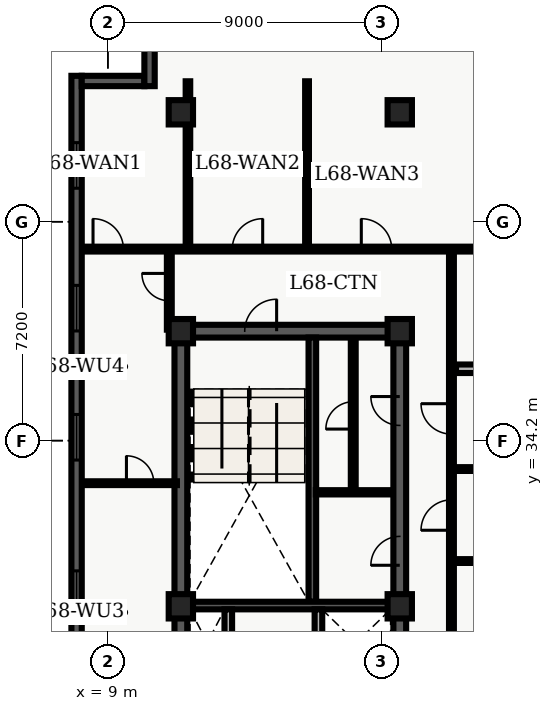
"""IFC4 building model, lengths in metres.
Left out: names, types, materials, properties, quantities, classifications, styles, units other than length and angle.
Written with IfcOpenShell. Run it as: python <this file> out.ifc"""

import sys

from ifc_helpers import new_model, entity, si_unit, converted_unit, direction, frame, origin_with_axes, origin_2d_with_axis, place, context, subcontext, project, spatial, polyline, rectangle, outline, extrude, element, fill, save


model = new_model("IFC4")
c1 = context("Model", 3, precision=1e-05, world=origin_with_axes(), true_north=direction((0.0, 1.0)))
c2 = subcontext(c1, "Body", "Model", "MODEL_VIEW")
j1 = project(units=[si_unit("LENGTHUNIT", "METRE"), converted_unit("PLANEANGLEUNIT", "DEGREE", entity("IfcPlaneAngleMeasure", 0.017), si_unit("PLANEANGLEUNIT", "RADIAN"), dimensions=[0, 0, 0, 0, 0, 0, 0])], contexts=[c1])
p1 = place(None, origin_with_axes())
s1 = spatial("IfcSite", under=j1, at=p1, CompositionType="ELEMENT")
p2 = place(p1, origin_with_axes())
s2 = spatial("IfcBuilding", under=s1, at=p2, CompositionType="ELEMENT")
p3 = place(p2, frame((0.0, 0.0, 276.3), z_axis=(0.0, 0.0, 1.0), x_axis=(1.0, 0.0, 0.0)))
s3 = spatial("IfcBuildingStorey", under=s2, at=p3, CompositionType="ELEMENT", Elevation=276.3)
p4 = place(p3, frame((11.4, 10.8, 0.0), z_axis=(0.0, 0.0, 1.0), x_axis=(0.0, 1.0, 0.0)))
e1 = element("IfcWall", 1, at=p4, inside=s3, PredefinedType="SHEAR", context=c2, shape_type="SweptSolid", body=[
    extrude(outline(polyline([(0.0, -0.21), (27.0, -0.21), (27.0, 0.21), (0.0, 0.21), (0.0, -0.21)])), origin_with_axes(), (0.0, 0.0, 1.0), 3.66),
])
p5 = place(p3, frame((11.4, 37.8, 0.0), z_axis=(0.0, 0.0, 1.0), x_axis=(1.0, 0.0, 0.0)))
e2 = element("IfcWall", 2, at=p5, inside=s3, PredefinedType="SHEAR", context=c2, shape_type="SweptSolid", body=[
    extrude(outline(polyline([(0.0, -0.21), (7.2, -0.21), (7.2, 0.21), (0.0, 0.21), (0.0, -0.21)])), origin_with_axes(), (0.0, 0.0, 1.0), 3.66),
])
p6 = place(p5, frame((2.625, 0.0, 0.0), z_axis=(0.0, 0.0, 1.0), x_axis=(1.0, 0.0, 0.0)))
e3 = element("IfcOpeningElement", 3, at=p6, cuts=e2, PredefinedType="OPENING", context=c2, shape_type="SweptSolid", body=[
    extrude(rectangle(XDim=1.05, YDim=0.44, at=origin_2d_with_axis()), origin_with_axes(), (0.0, 0.0, 1.0), 2.15),
])
p7 = place(p3, frame((18.6, 24.3, 0.0), z_axis=(0.0, 0.0, 1.0), x_axis=(0.0, 1.0, 0.0)))
e4 = element("IfcWall", 4, at=p7, inside=s3, PredefinedType="SHEAR", context=c2, shape_type="SweptSolid", body=[
    extrude(outline(polyline([(0.0, -0.21), (13.5, -0.21), (13.5, 0.21), (0.0, 0.21), (0.0, -0.21)])), origin_with_axes(), (0.0, 0.0, 1.0), 3.66),
])
p8 = place(p7, frame((6.275, 0.0, 0.0), z_axis=(0.0, 0.0, 1.0), x_axis=(1.0, 0.0, 0.0)))
e5 = element("IfcOpeningElement", 5, at=p8, cuts=e4, PredefinedType="OPENING", context=c2, shape_type="SweptSolid", body=[
    extrude(rectangle(XDim=0.95, YDim=0.44, at=origin_2d_with_axis()), origin_with_axes(), (0.0, 0.0, 1.0), 2.15),
])
p9 = place(p7, frame((10.875, 0.0, 0.0), z_axis=(0.0, 0.0, 1.0), x_axis=(1.0, 0.0, 0.0)))
e6 = element("IfcOpeningElement", 6, at=p9, cuts=e4, PredefinedType="OPENING", context=c2, shape_type="SweptSolid", body=[
    extrude(rectangle(XDim=0.95, YDim=0.44, at=origin_2d_with_axis()), origin_with_axes(), (0.0, 0.0, 1.0), 2.15),
])
p10 = place(p3, frame((15.725, 28.9, 0.0), z_axis=(0.0, 0.0, 1.0), x_axis=(0.0, 1.0, 0.0)))
e7 = element("IfcWall", 7, at=p10, inside=s3, PredefinedType="SHEAR", context=c2, shape_type="SweptSolid", body=[
    extrude(outline(polyline([(0.0, -0.125), (8.69, -0.125), (8.69, 0.125), (0.0, 0.125), (0.0, -0.125)])), origin_with_axes(), (0.0, 0.0, 1.0), 3.66),
])
p11 = place(p3, frame((11.61, 28.775, 0.0), z_axis=(0.0, 0.0, 1.0), x_axis=(1.0, 0.0, 0.0)))
e8 = element("IfcWall", 8, at=p11, inside=s3, PredefinedType="SHEAR", context=c2, shape_type="SweptSolid", body=[
    extrude(outline(polyline([(0.0, -0.125), (6.78, -0.125), (6.78, 0.125), (0.0, 0.125), (0.0, -0.125)])), origin_with_axes(), (0.0, 0.0, 1.0), 3.66),
])
for number, where, z_axis, x_axis in (
    (9, (12.96, 26.45, 0.0), (0.0, 0.0, 1.0), (0.0, 1.0, 0.0)),
    (10, (15.925, 26.45, 0.0), (0.0, 0.0, 1.0), (0.0, 1.0, 0.0)),
):
    element("IfcWall", number, at=place(p3, frame(where, z_axis=z_axis, x_axis=x_axis)), inside=s3, PredefinedType="SOLIDWALL", context=c2, shape_type="SweptSolid", body=[
        extrude(outline(polyline([(0.0, -0.125), (2.2, -0.125), (2.2, 0.125), (0.0, 0.125), (0.0, -0.125)])), origin_with_axes(), (0.0, 0.0, 1.0), 2.7),
    ])
for number, where, z_axis, x_axis in (
    (11, (11.4, 28.75, 0.0), (0.0, 0.0, 1.0), (1.0, 0.0, 0.0)),
    (12, (11.4, 37.8, 0.0), (0.0, 0.0, 1.0), (1.0, 0.0, 0.0)),
    (13, (11.4, 45.0, 0.0), (0.0, 0.0, 1.0), (1.0, 0.0, 0.0)),
    (14, (18.6, 28.75, 0.0), (0.0, 0.0, 1.0), (1.0, 0.0, 0.0)),
    (15, (18.6, 37.8, 0.0), (0.0, 0.0, 1.0), (1.0, 0.0, 0.0)),
    (16, (18.6, 45.0, 0.0), (0.0, 0.0, 1.0), (1.0, 0.0, 0.0)),
):
    element("IfcColumn", number, at=place(p3, frame(where, z_axis=z_axis, x_axis=x_axis)), inside=s3, PredefinedType="COLUMN", context=c2, shape_type="SweptSolid", body=[
        extrude(rectangle(XDim=0.8, YDim=0.8, at=origin_2d_with_axis()), origin_with_axes(), (0.0, 0.0, 1.0), 3.9),
    ])
p12 = place(p3, frame((15.84, 32.5, 0.0), z_axis=(0.0, 0.0, 1.0), x_axis=(1.0, 0.0, 0.0)))
e17 = element("IfcWall", 17, at=p12, inside=s3, PredefinedType="PARTITIONING", context=c2, shape_type="SweptSolid", body=[
    extrude(outline(polyline([(0.0, -0.07), (2.46, -0.07), (2.46, 0.07), (0.0, 0.07), (0.0, -0.07)])), origin_with_axes(), (0.0, 0.0, 1.0), 2.7),
])
p13 = place(p3, frame((17.07, 32.58, 0.0), z_axis=(0.0, 0.0, 1.0), x_axis=(0.0, 1.0, 0.0)))
e18 = element("IfcWall", 18, at=p13, inside=s3, PredefinedType="PARTITIONING", context=c2, shape_type="SweptSolid", body=[
    extrude(outline(polyline([(0.0, -0.08), (4.92, -0.08), (4.92, 0.08), (0.0, 0.08), (0.0, -0.08)])), origin_with_axes(), (0.0, 0.0, 1.0), 2.7),
])
p14 = place(p13, frame((2.45, 0.0, 0.0), z_axis=(0.0, 0.0, 1.0), x_axis=(1.0, 0.0, 0.0)))
e19 = element("IfcOpeningElement", 19, at=p14, cuts=e18, PredefinedType="OPENING", context=c2, shape_type="SweptSolid", body=[
    extrude(rectangle(XDim=0.9, YDim=0.18, at=origin_2d_with_axis()), origin_with_axes(), (0.0, 0.0, 1.0), 2.15),
])
p15 = place(p3, frame((8.135, 40.5, 0.0), z_axis=(0.0, 0.0, 1.0), x_axis=(1.0, 0.0, 0.0)))
e20 = element("IfcWall", 20, at=p15, inside=s3, PredefinedType="PARTITIONING", context=c2, shape_type="SweptSolid", body=[
    extrude(outline(polyline([(0.0, -0.08), (23.93, -0.08), (23.93, 0.08), (0.0, 0.08), (0.0, -0.08)])), origin_with_axes(), (0.0, 0.0, 1.0), 2.7),
])
p16 = place(p15, frame((0.876, 0.0, 0.0), z_axis=(0.0, 0.0, 1.0), x_axis=(1.0, 0.0, 0.0)))
e21 = element("IfcOpeningElement", 21, at=p16, cuts=e20, PredefinedType="OPENING", context=c2, shape_type="SweptSolid", body=[
    extrude(rectangle(XDim=1.0, YDim=0.18, at=origin_2d_with_axis()), origin_with_axes(), (0.0, 0.0, 1.0), 2.15),
])
p17 = place(p15, frame((5.457, 0.0, 0.0), z_axis=(0.0, 0.0, 1.0), x_axis=(1.0, 0.0, 0.0)))
e22 = element("IfcOpeningElement", 22, at=p17, cuts=e20, PredefinedType="OPENING", context=c2, shape_type="SweptSolid", body=[
    extrude(rectangle(XDim=1.0, YDim=0.18, at=origin_2d_with_axis()), origin_with_axes(), (0.0, 0.0, 1.0), 2.15),
])
p18 = place(p15, frame((9.7, 0.0, 0.0), z_axis=(0.0, 0.0, 1.0), x_axis=(1.0, 0.0, 0.0)))
e23 = element("IfcOpeningElement", 23, at=p18, cuts=e20, PredefinedType="OPENING", context=c2, shape_type="SweptSolid", body=[
    extrude(rectangle(XDim=1.0, YDim=0.18, at=origin_2d_with_axis()), origin_with_axes(), (0.0, 0.0, 1.0), 2.15),
])
p19 = place(p3, frame((20.3, 7.8, 0.0), z_axis=(0.0, 0.0, 1.0), x_axis=(0.0, 1.0, 0.0)))
e24 = element("IfcWall", 24, at=p19, inside=s3, PredefinedType="PARTITIONING", context=c2, shape_type="SweptSolid", body=[
    extrude(outline(polyline([(0.0, -0.08), (32.7, -0.08), (32.7, 0.08), (0.0, 0.08), (0.0, -0.08)])), origin_with_axes(), (0.0, 0.0, 1.0), 2.7),
])
p20 = place(p19, frame((14.392, 0.0, 0.0), z_axis=(0.0, 0.0, 1.0), x_axis=(1.0, 0.0, 0.0)))
e25 = element("IfcOpeningElement", 25, at=p20, cuts=e24, PredefinedType="OPENING", context=c2, shape_type="SweptSolid", body=[
    extrude(rectangle(XDim=1.0, YDim=0.18, at=origin_2d_with_axis()), origin_with_axes(), (0.0, 0.0, 1.0), 2.15),
])
p21 = place(p19, frame((18.846, 0.0, 0.0), z_axis=(0.0, 0.0, 1.0), x_axis=(1.0, 0.0, 0.0)))
e26 = element("IfcOpeningElement", 26, at=p21, cuts=e24, PredefinedType="OPENING", context=c2, shape_type="SweptSolid", body=[
    extrude(rectangle(XDim=1.0, YDim=0.18, at=origin_2d_with_axis()), origin_with_axes(), (0.0, 0.0, 1.0), 2.15),
])
p22 = place(p19, frame((23.952, 0.0, 0.0), z_axis=(0.0, 0.0, 1.0), x_axis=(1.0, 0.0, 0.0)))
e27 = element("IfcOpeningElement", 27, at=p22, cuts=e24, PredefinedType="OPENING", context=c2, shape_type="SweptSolid", body=[
    extrude(rectangle(XDim=1.0, YDim=0.18, at=origin_2d_with_axis()), origin_with_axes(), (0.0, 0.0, 1.0), 2.15),
])
p23 = place(p19, frame((27.114, 0.0, 0.0), z_axis=(0.0, 0.0, 1.0), x_axis=(1.0, 0.0, 0.0)))
e28 = element("IfcOpeningElement", 28, at=p23, cuts=e24, PredefinedType="OPENING", context=c2, shape_type="SweptSolid", body=[
    extrude(rectangle(XDim=1.0, YDim=0.18, at=origin_2d_with_axis()), origin_with_axes(), (0.0, 0.0, 1.0), 2.15),
])
p24 = place(p19, frame((6.675, 0.0, 0.0), z_axis=(0.0, 0.0, 1.0), x_axis=(1.0, 0.0, 0.0)))
e29 = element("IfcOpeningElement", 29, at=p24, cuts=e24, PredefinedType="OPENING", context=c2, shape_type="SweptSolid", body=[
    extrude(rectangle(XDim=1.05, YDim=0.18, at=origin_2d_with_axis()), origin_with_axes(), (0.0, 0.0, 1.0), 2.15),
])
p25 = place(p3, frame((11.02, 37.85, 0.0), z_axis=(0.0, 0.0, 1.0), x_axis=(0.0, 1.0, 0.0)))
e30 = element("IfcWall", 30, at=p25, inside=s3, PredefinedType="PARTITIONING", context=c2, shape_type="SweptSolid", body=[
    extrude(outline(polyline([(0.0, -0.08), (2.65, -0.08), (2.65, 0.08), (0.0, 0.08), (0.0, -0.08)])), origin_with_axes(), (0.0, 0.0, 1.0), 2.7),
])
p26 = place(p25, frame((1.4, 0.0, 0.0), z_axis=(0.0, 0.0, 1.0), x_axis=(1.0, 0.0, 0.0)))
e31 = element("IfcOpeningElement", 31, at=p26, cuts=e30, PredefinedType="OPENING", context=c2, shape_type="SweptSolid", body=[
    extrude(rectangle(XDim=0.9, YDim=0.18, at=origin_2d_with_axis()), origin_with_axes(), (0.0, 0.0, 1.0), 2.15),
])
p27 = place(p3, frame((8.135, 32.8, 0.0), z_axis=(0.0, 0.0, 1.0), x_axis=(1.0, 0.0, 0.0)))
e32 = element("IfcWall", 32, at=p27, inside=s3, PredefinedType="PARTITIONING", context=c2, shape_type="SweptSolid", body=[
    extrude(outline(polyline([(0.0, -0.062), (3.135, -0.062), (3.135, 0.062), (0.0, 0.062), (0.0, -0.062)])), origin_with_axes(), (0.0, 0.0, 1.0), 2.7),
])
p28 = place(p27, frame((1.925, 0.0, 0.0), z_axis=(0.0, 0.0, 1.0), x_axis=(1.0, 0.0, 0.0)))
e33 = element("IfcOpeningElement", 33, at=p28, cuts=e32, PredefinedType="OPENING", context=c2, shape_type="SweptSolid", body=[
    extrude(rectangle(XDim=0.9, YDim=0.145, at=origin_2d_with_axis()), origin_with_axes(), (0.0, 0.0, 1.0), 2.15),
])
p29 = place(p3, frame((11.633, 40.6, 0.0), z_axis=(0.0, 0.0, 1.0), x_axis=(0.0, 1.0, 0.0)))
e34 = element("IfcWall", 34, at=p29, inside=s3, PredefinedType="PARTITIONING", context=c2, shape_type="SweptSolid", body=[
    extrude(outline(polyline([(0.0, -0.075), (5.42, -0.075), (5.42, 0.075), (0.0, 0.075), (0.0, -0.075)])), origin_with_axes(), (0.0, 0.0, 1.0), 2.7),
])
p30 = place(p3, frame((15.55, 40.6, 0.0), z_axis=(0.0, 0.0, 1.0), x_axis=(0.0, 1.0, 0.0)))
e35 = element("IfcWall", 35, at=p30, inside=s3, PredefinedType="PARTITIONING", context=c2, shape_type="SweptSolid", body=[
    extrude(outline(polyline([(0.0, -0.062), (5.42, -0.062), (5.42, 0.062), (0.0, 0.062), (0.0, -0.062)])), origin_with_axes(), (0.0, 0.0, 1.0), 2.7),
])
for number, where, z_axis, x_axis in (
    (36, (20.45, 30.239, 0.0), (0.0, 0.0, 1.0), (1.0, 0.0, 0.0)),
    (37, (20.45, 33.265, 0.0), (0.0, 0.0, 1.0), (1.0, 0.0, 0.0)),
):
    element("IfcWall", number, at=place(p3, frame(where, z_axis=z_axis, x_axis=x_axis)), inside=s3, PredefinedType="PARTITIONING", context=c2, shape_type="SweptSolid", body=[
        extrude(outline(polyline([(0.0, -0.062), (11.615, -0.062), (11.615, 0.062), (0.0, 0.062), (0.0, -0.062)])), origin_with_axes(), (0.0, 0.0, 1.0), 2.7),
    ])
p31 = place(p3, frame((20.45, 36.564, 0.0), z_axis=(0.0, 0.0, 1.0), x_axis=(1.0, 0.0, 0.0)))
e38 = element("IfcWall", 38, at=p31, inside=s3, PredefinedType="PARTITIONING", context=c2, shape_type="SweptSolid", body=[
    extrude(outline(polyline([(0.0, -0.14), (11.615, -0.14), (11.615, 0.14), (0.0, 0.14), (0.0, -0.14)])), origin_with_axes(), (0.0, 0.0, 1.0), 2.7),
])
p32 = place(p31, frame((5.785, 0.0, 0.0), z_axis=(0.0, 0.0, 1.0), x_axis=(1.0, 0.0, 0.0)))
e39 = element("IfcOpeningElement", 39, at=p32, cuts=e38, PredefinedType="OPENING", context=c2, shape_type="SweptSolid", body=[
    extrude(rectangle(XDim=0.95, YDim=0.3, at=origin_2d_with_axis()), origin_with_axes(), (0.0, 0.0, 1.0), 2.15),
])
p33 = place(p3, frame((7.97, 2.74, 0.0), z_axis=(0.0, 0.0, 1.0), x_axis=(0.0, 1.0, 0.0)))
e40 = element("IfcWall", 40, at=p33, inside=s3, PredefinedType="SOLIDWALL", context=c2, shape_type="SweptSolid", body=[
    extrude(outline(polyline([(0.0, -0.17), (43.46, -0.17), (43.46, 0.17), (0.0, 0.17), (0.0, -0.17)])), origin_with_axes(), (0.0, 0.0, 1.0), 3.66),
])
p34 = place(p33, frame((2.948, 0.0, 0.45), z_axis=(0.0, 0.0, 1.0), x_axis=(1.0, 0.0, 0.0)))
e41 = element("IfcOpeningElement", 41, at=p34, cuts=e40, PredefinedType="OPENING", context=c2, shape_type="SweptSolid", body=[
    extrude(rectangle(XDim=1.5, YDim=0.36, at=origin_2d_with_axis()), origin_with_axes(), (0.0, 0.0, 1.0), 2.1),
])
p35 = place(p33, frame((7.643, 0.0, 0.45), z_axis=(0.0, 0.0, 1.0), x_axis=(1.0, 0.0, 0.0)))
e42 = element("IfcOpeningElement", 42, at=p35, cuts=e40, PredefinedType="OPENING", context=c2, shape_type="SweptSolid", body=[
    extrude(rectangle(XDim=1.5, YDim=0.36, at=origin_2d_with_axis()), origin_with_axes(), (0.0, 0.0, 1.0), 2.1),
])
p36 = place(p33, frame((17.034, 0.0, 0.45), z_axis=(0.0, 0.0, 1.0), x_axis=(1.0, 0.0, 0.0)))
e43 = element("IfcOpeningElement", 43, at=p36, cuts=e40, PredefinedType="OPENING", context=c2, shape_type="SweptSolid", body=[
    extrude(rectangle(XDim=1.5, YDim=0.36, at=origin_2d_with_axis()), origin_with_axes(), (0.0, 0.0, 1.0), 2.1),
])
p37 = place(p33, frame((26.426, 0.0, 0.45), z_axis=(0.0, 0.0, 1.0), x_axis=(1.0, 0.0, 0.0)))
e44 = element("IfcOpeningElement", 44, at=p37, cuts=e40, PredefinedType="OPENING", context=c2, shape_type="SweptSolid", body=[
    extrude(rectangle(XDim=1.5, YDim=0.36, at=origin_2d_with_axis()), origin_with_axes(), (0.0, 0.0, 1.0), 2.1),
])
p38 = place(p33, frame((31.571, 0.0, 0.45), z_axis=(0.0, 0.0, 1.0), x_axis=(1.0, 0.0, 0.0)))
e45 = element("IfcOpeningElement", 45, at=p38, cuts=e40, PredefinedType="OPENING", context=c2, shape_type="SweptSolid", body=[
    extrude(rectangle(XDim=1.5, YDim=0.36, at=origin_2d_with_axis()), origin_with_axes(), (0.0, 0.0, 1.0), 2.1),
])
p39 = place(p33, frame((35.817, 0.0, 0.45), z_axis=(0.0, 0.0, 1.0), x_axis=(1.0, 0.0, 0.0)))
e46 = element("IfcOpeningElement", 46, at=p39, cuts=e40, PredefinedType="OPENING", context=c2, shape_type="SweptSolid", body=[
    extrude(rectangle(XDim=1.5, YDim=0.36, at=origin_2d_with_axis()), origin_with_axes(), (0.0, 0.0, 1.0), 2.1),
])
p40 = place(p33, frame((40.512, 0.0, 0.45), z_axis=(0.0, 0.0, 1.0), x_axis=(1.0, 0.0, 0.0)))
e47 = element("IfcOpeningElement", 47, at=p40, cuts=e40, PredefinedType="OPENING", context=c2, shape_type="SweptSolid", body=[
    extrude(rectangle(XDim=1.5, YDim=0.36, at=origin_2d_with_axis()), origin_with_axes(), (0.0, 0.0, 1.0), 2.1),
])
p41 = place(p3, frame((8.14, 46.03, 0.0), z_axis=(0.0, 0.0, 1.0), x_axis=(1.0, 0.0, 0.0)))
e48 = element("IfcWall", 48, at=p41, inside=s3, PredefinedType="SOLIDWALL", context=c2, shape_type="SweptSolid", body=[
    extrude(outline(polyline([(0.0, -0.17), (2.06, -0.17), (2.06, 0.17), (0.0, 0.17), (0.0, -0.17)])), origin_with_axes(), (0.0, 0.0, 1.0), 3.66),
])
p42 = place(p3, frame((10.37, 45.86, 0.0), z_axis=(0.0, 0.0, 1.0), x_axis=(0.0, 1.0, 0.0)))
e49 = element("IfcWall", 49, at=p42, inside=s3, PredefinedType="SOLIDWALL", context=c2, shape_type="SweptSolid", body=[
    extrude(outline(polyline([(0.0, -0.17), (2.74, -0.17), (2.74, 0.17), (0.0, 0.17), (0.0, -0.17)])), origin_with_axes(), (0.0, 0.0, 1.0), 3.66),
])
p43 = place(p5, frame((2.625, 0.0, 0.0), z_axis=(0.0, 0.0, 1.0), x_axis=(1.0, 0.0, 0.0)))
e50 = element("IfcDoor", 50, at=p43, inside=s3, OperationType="SINGLE_SWING_RIGHT", PredefinedType="DOOR", context=c2, shape_type="SweptSolid", body=[
    extrude(rectangle(XDim=1.05, YDim=0.09, at=origin_2d_with_axis()), origin_with_axes(), (0.0, 0.0, 1.0), 2.15),
])
fill(e3, e50)
p44 = place(p7, frame((6.275, 0.0, 0.0), z_axis=(0.0, 0.0, 1.0), x_axis=(1.0, 0.0, 0.0)))
e51 = element("IfcDoor", 51, at=p44, inside=s3, OperationType="SINGLE_SWING_LEFT", PredefinedType="DOOR", context=c2, shape_type="SweptSolid", body=[
    extrude(rectangle(XDim=0.95, YDim=0.09, at=origin_2d_with_axis()), origin_with_axes(), (0.0, 0.0, 1.0), 2.15),
])
fill(e5, e51)
p45 = place(p13, frame((2.45, 0.0, 0.0), z_axis=(0.0, 0.0, 1.0), x_axis=(1.0, 0.0, 0.0)))
e52 = element("IfcDoor", 52, at=p45, inside=s3, OperationType="SINGLE_SWING_LEFT", PredefinedType="DOOR", context=c2, shape_type="SweptSolid", body=[
    extrude(rectangle(XDim=0.9, YDim=0.09, at=origin_2d_with_axis()), origin_with_axes(), (0.0, 0.0, 1.0), 2.15),
])
fill(e19, e52)
p46 = place(p7, frame((10.875, 0.0, 0.0), z_axis=(0.0, 0.0, 1.0), x_axis=(1.0, 0.0, 0.0)))
e53 = element("IfcDoor", 53, at=p46, inside=s3, OperationType="SINGLE_SWING_RIGHT", PredefinedType="DOOR", context=c2, shape_type="SweptSolid", body=[
    extrude(rectangle(XDim=0.95, YDim=0.09, at=origin_2d_with_axis()), origin_with_axes(), (0.0, 0.0, 1.0), 2.15),
])
fill(e6, e53)
p47 = place(p27, frame((1.925, 0.0, 0.0), z_axis=(0.0, 0.0, 1.0), x_axis=(1.0, 0.0, 0.0)))
e54 = element("IfcDoor", 54, at=p47, inside=s3, OperationType="SINGLE_SWING_LEFT", PredefinedType="DOOR", context=c2, shape_type="SweptSolid", body=[
    extrude(rectangle(XDim=0.9, YDim=0.075, at=origin_2d_with_axis()), origin_with_axes(), (0.0, 0.0, 1.0), 2.15),
])
fill(e33, e54)
p48 = place(p25, frame((1.4, 0.0, 0.0), z_axis=(0.0, 0.0, 1.0), x_axis=(1.0, 0.0, 0.0)))
e55 = element("IfcDoor", 55, at=p48, inside=s3, OperationType="SINGLE_SWING_RIGHT", PredefinedType="DOOR", context=c2, shape_type="SweptSolid", body=[
    extrude(rectangle(XDim=0.9, YDim=0.09, at=origin_2d_with_axis()), origin_with_axes(), (0.0, 0.0, 1.0), 2.15),
])
fill(e31, e55)
p49 = place(p15, frame((0.876, 0.0, 0.0), z_axis=(0.0, 0.0, 1.0), x_axis=(1.0, 0.0, 0.0)))
e56 = element("IfcDoor", 56, at=p49, inside=s3, OperationType="SINGLE_SWING_LEFT", PredefinedType="DOOR", context=c2, shape_type="SweptSolid", body=[
    extrude(rectangle(XDim=1.0, YDim=0.09, at=origin_2d_with_axis()), origin_with_axes(), (0.0, 0.0, 1.0), 2.15),
])
fill(e21, e56)
p50 = place(p15, frame((5.457, 0.0, 0.0), z_axis=(0.0, 0.0, 1.0), x_axis=(1.0, 0.0, 0.0)))
e57 = element("IfcDoor", 57, at=p50, inside=s3, OperationType="SINGLE_SWING_RIGHT", PredefinedType="DOOR", context=c2, shape_type="SweptSolid", body=[
    extrude(rectangle(XDim=1.0, YDim=0.09, at=origin_2d_with_axis()), origin_with_axes(), (0.0, 0.0, 1.0), 2.15),
])
fill(e22, e57)
p51 = place(p15, frame((9.7, 0.0, 0.0), z_axis=(0.0, 0.0, 1.0), x_axis=(1.0, 0.0, 0.0)))
e58 = element("IfcDoor", 58, at=p51, inside=s3, OperationType="SINGLE_SWING_LEFT", PredefinedType="DOOR", context=c2, shape_type="SweptSolid", body=[
    extrude(rectangle(XDim=1.0, YDim=0.09, at=origin_2d_with_axis()), origin_with_axes(), (0.0, 0.0, 1.0), 2.15),
])
fill(e23, e58)
p52 = place(p19, frame((23.952, 0.0, 0.0), z_axis=(0.0, 0.0, 1.0), x_axis=(1.0, 0.0, 0.0)))
e59 = element("IfcDoor", 59, at=p52, inside=s3, OperationType="SINGLE_SWING_LEFT", PredefinedType="DOOR", context=c2, shape_type="SweptSolid", body=[
    extrude(rectangle(XDim=1.0, YDim=0.09, at=origin_2d_with_axis()), origin_with_axes(), (0.0, 0.0, 1.0), 2.15),
])
fill(e27, e59)
p53 = place(p19, frame((27.114, 0.0, 0.0), z_axis=(0.0, 0.0, 1.0), x_axis=(1.0, 0.0, 0.0)))
e60 = element("IfcDoor", 60, at=p53, inside=s3, OperationType="SINGLE_SWING_RIGHT", PredefinedType="DOOR", context=c2, shape_type="SweptSolid", body=[
    extrude(rectangle(XDim=1.0, YDim=0.09, at=origin_2d_with_axis()), origin_with_axes(), (0.0, 0.0, 1.0), 2.15),
])
fill(e28, e60)
p54 = place(p33, frame((26.426, 0.0, 0.45), z_axis=(0.0, 0.0, 1.0), x_axis=(1.0, 0.0, 0.0)))
e61 = element("IfcWindow", 61, at=p54, inside=s3, PredefinedType="WINDOW", context=c2, shape_type="SweptSolid", body=[
    extrude(rectangle(XDim=1.5, YDim=0.09, at=origin_2d_with_axis()), origin_with_axes(), (0.0, 0.0, 1.0), 2.1),
])
fill(e44, e61)
p55 = place(p33, frame((31.571, 0.0, 0.45), z_axis=(0.0, 0.0, 1.0), x_axis=(1.0, 0.0, 0.0)))
e62 = element("IfcWindow", 62, at=p55, inside=s3, PredefinedType="WINDOW", context=c2, shape_type="SweptSolid", body=[
    extrude(rectangle(XDim=1.5, YDim=0.09, at=origin_2d_with_axis()), origin_with_axes(), (0.0, 0.0, 1.0), 2.1),
])
fill(e45, e62)
p56 = place(p33, frame((35.817, 0.0, 0.45), z_axis=(0.0, 0.0, 1.0), x_axis=(1.0, 0.0, 0.0)))
e63 = element("IfcWindow", 63, at=p56, inside=s3, PredefinedType="WINDOW", context=c2, shape_type="SweptSolid", body=[
    extrude(rectangle(XDim=1.5, YDim=0.09, at=origin_2d_with_axis()), origin_with_axes(), (0.0, 0.0, 1.0), 2.1),
])
fill(e46, e63)
p57 = place(p33, frame((40.512, 0.0, 0.45), z_axis=(0.0, 0.0, 1.0), x_axis=(1.0, 0.0, 0.0)))
e64 = element("IfcWindow", 64, at=p57, inside=s3, PredefinedType="WINDOW", context=c2, shape_type="SweptSolid", body=[
    extrude(rectangle(XDim=1.5, YDim=0.09, at=origin_2d_with_axis()), origin_with_axes(), (0.0, 0.0, 1.0), 2.1),
])
fill(e47, e64)
save(model, sys.argv[1])
